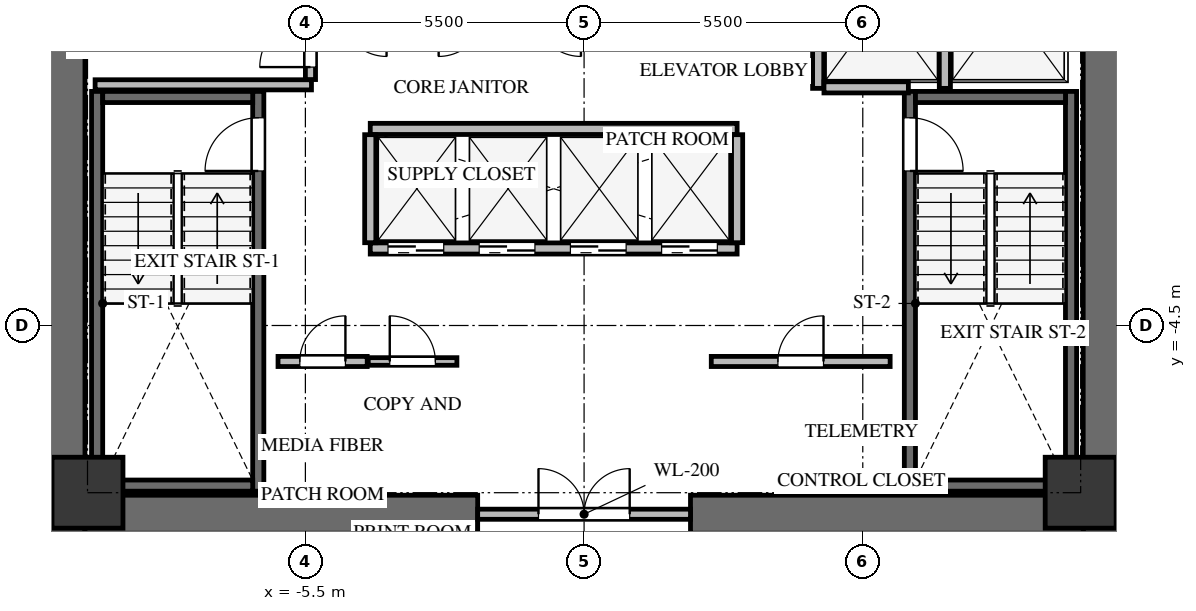
"""IFC4 building model, lengths in metres.
Left out: names, types, materials, properties, quantities, classifications, styles, units other than length and angle.
Written with IfcOpenShell. Run it as: python <this file> out.ifc"""

import sys

from ifc_helpers import new_model, si_unit, direction, frame, frame_2d, origin, origin_2d, place, context, subcontext, project, spatial, rectangle, extrude, source, transform, mapped, element, fill, save


model = new_model("IFC4")
c1 = context("Model", 3, precision=1e-05, world=origin(), true_north=direction((0.0, 1.0)))
c2 = subcontext(c1, "Body", "Model", "MODEL_VIEW")
j1 = project(units=[si_unit("LENGTHUNIT", "METRE"), si_unit("PLANEANGLEUNIT", "RADIAN")], contexts=[c1])
p1 = place(None, origin())
s1 = spatial("IfcSite", under=j1, at=p1, CompositionType="ELEMENT")
p2 = place(p1, origin())
s2 = spatial("IfcBuilding", under=s1, at=p2, CompositionType="ELEMENT")
p3 = place(p2, frame((0.0, 0.0, 120.6)))
s3 = spatial("IfcBuildingStorey", under=s2, at=p3, CompositionType="ELEMENT", Elevation=120.6)
for number, where, z_axis, x_axis in (
    (1, (-10.225, -8.6, 0.0), (0.0, 0.0, 1.0), (0.0, 1.0, 0.0)),
    (2, (10.225, -8.6, 0.0), (0.0, 0.0, 1.0), (0.0, 1.0, 0.0)),
):
    element("IfcWall", number, at=place(p3, frame(where, z_axis=z_axis, x_axis=x_axis)), inside=s3, PredefinedType="SHEAR", context=c2, shape_type="SweptSolid", body=[
        extrude(rectangle(XDim=17.2, YDim=0.75, at=frame_2d((8.6, 0.0))), origin(), (0.0, 0.0, 1.0), 3.3),
    ])
for number, where, z_axis, x_axis in (
    (3, (-9.85, -8.225, 0.0), (0.0, 0.0, 1.0), (1.0, 0.0, 0.0)),
    (4, (2.1, -8.225, 0.0), (0.0, 0.0, 1.0), (1.0, 0.0, 0.0)),
):
    element("IfcWall", number, at=place(p3, frame(where, z_axis=z_axis, x_axis=x_axis)), inside=s3, PredefinedType="SHEAR", context=c2, shape_type="SweptSolid", body=[
        extrude(rectangle(XDim=7.75, YDim=0.75, at=frame_2d((3.875, 0.0))), origin(), (0.0, 0.0, 1.0), 3.3),
    ])
p4 = place(p3, frame((-6.43, -7.77, -0.24), z_axis=(0.0, 0.0, 1.0), x_axis=(0.0, 1.0, 0.0)))
e5 = element("IfcWall", 5, at=p4, inside=s3, PredefinedType="SHEAR", context=c2, shape_type="SweptSolid", body=[
    extrude(rectangle(XDim=7.89, YDim=0.22, at=frame_2d((3.945, 0.0))), origin(), (0.0, 0.0, 1.0), 3.3),
])
p5 = place(p4, frame((6.32, 0.0, 0.0)))
e6 = element("IfcOpeningElement", 6, at=p5, cuts=e5, PredefinedType="OPENING", context=c2, shape_type="SweptSolid", body=[
    extrude(rectangle(XDim=1.05, YDim=2.15, at=frame_2d((0.525, 1.075))), frame((0.0, 0.12, 0.0), z_axis=(0.0, -1.0, 0.0), x_axis=(1.0, 0.0, 0.0)), (0.0, 0.0, 1.0), 0.24),
])
p6 = place(p3, frame((-9.61, 0.12, -0.24), z_axis=(0.0, 0.0, 1.0), x_axis=(0.0, -1.0, 0.0)))
e7 = element("IfcWall", 7, at=p6, inside=s3, PredefinedType="SHEAR", context=c2, shape_type="SweptSolid", body=[
    extrude(rectangle(XDim=7.89, YDim=0.22, at=frame_2d((3.945, 0.0))), origin(), (0.0, 0.0, 1.0), 3.3),
])
for number, where, z_axis, x_axis in (
    (8, (-9.5, -7.66, -0.24), (0.0, 0.0, 1.0), (1.0, 0.0, 0.0)),
    (9, (-6.54, 0.01, -0.24), (0.0, 0.0, 1.0), (-1.0, 0.0, 0.0)),
):
    element("IfcWall", number, at=place(p3, frame(where, z_axis=z_axis, x_axis=x_axis)), inside=s3, PredefinedType="SHEAR", context=c2, shape_type="SweptSolid", body=[
        extrude(rectangle(XDim=2.96, YDim=0.22, at=frame_2d((1.48, 0.0))), origin(), (0.0, 0.0, 1.0), 3.3),
    ])
p7 = place(p3, frame((9.61, -7.77, -0.24), z_axis=(0.0, 0.0, 1.0), x_axis=(0.0, 1.0, 0.0)))
e10 = element("IfcWall", 10, at=p7, inside=s3, PredefinedType="SHEAR", context=c2, shape_type="SweptSolid", body=[
    extrude(rectangle(XDim=7.89, YDim=0.22, at=frame_2d((3.945, 0.0))), origin(), (0.0, 0.0, 1.0), 3.3),
])
p8 = place(p3, frame((6.43, 0.12, -0.24), z_axis=(0.0, 0.0, 1.0), x_axis=(0.0, -1.0, 0.0)))
e11 = element("IfcWall", 11, at=p8, inside=s3, PredefinedType="SHEAR", context=c2, shape_type="SweptSolid", body=[
    extrude(rectangle(XDim=7.89, YDim=0.22, at=frame_2d((3.945, 0.0))), origin(), (0.0, 0.0, 1.0), 3.3),
])
p9 = place(p8, frame((0.52, 0.0, 0.0)))
e12 = element("IfcOpeningElement", 12, at=p9, cuts=e11, PredefinedType="OPENING", context=c2, shape_type="SweptSolid", body=[
    extrude(rectangle(XDim=1.05, YDim=2.15, at=frame_2d((0.525, 1.075))), frame((0.0, 0.12, 0.0), z_axis=(0.0, -1.0, 0.0), x_axis=(1.0, 0.0, 0.0)), (0.0, 0.0, 1.0), 0.24),
])
for number, where, z_axis, x_axis in (
    (13, (6.54, -7.66, -0.24), (0.0, 0.0, 1.0), (1.0, 0.0, 0.0)),
    (14, (9.5, 0.01, -0.24), (0.0, 0.0, 1.0), (-1.0, 0.0, 0.0)),
):
    element("IfcWall", number, at=place(p3, frame(where, z_axis=z_axis, x_axis=x_axis)), inside=s3, PredefinedType="SHEAR", context=c2, shape_type="SweptSolid", body=[
        extrude(rectangle(XDim=2.96, YDim=0.22, at=frame_2d((1.48, 0.0))), origin(), (0.0, 0.0, 1.0), 3.3),
    ])
m1 = source(origin(), c2, "Body", "SweptSolid", [
    extrude(rectangle(XDim=1.4, YDim=1.4, at=origin_2d()), origin(), (0.0, 0.0, 1.0), 3.3),
])
for number, where, z_axis, x_axis in (
    (15, (-9.8, -7.8, -0.24), (0.0, 0.0, 1.0), (1.0, 0.0, 0.0)),
    (16, (9.8, -7.8, -0.24), (0.0, 0.0, 1.0), (1.0, 0.0, 0.0)),
):
    element("IfcColumn", number, at=place(p3, frame(where, z_axis=z_axis, x_axis=x_axis)), inside=s3, PredefinedType="COLUMN", context=c2, shape_type="MappedRepresentation", body=[
        mapped(m1, transform((0.0, 0.0, 0.0), x_axis=(1.0, 0.0, 0.0), y_axis=(0.0, 1.0, 0.0), z_axis=(0.0, 0.0, 1.0), scale=1.0)),
    ])
p10 = place(p3, frame((-2.1, -8.225, 0.0), z_axis=(0.0, 0.0, 1.0), x_axis=(1.0, 0.0, 0.0)))
e17 = element("IfcWall", 17, at=p10, inside=s3, PredefinedType="SOLIDWALL", context=c2, shape_type="SweptSolid", body=[
    extrude(rectangle(XDim=4.2, YDim=0.2, at=frame_2d((2.1, 0.0))), origin(), (0.0, 0.0, 1.0), 3.045),
])
p11 = place(p10, frame((1.2, 0.0, 0.0)))
e18 = element("IfcOpeningElement", 18, at=p11, cuts=e17, PredefinedType="OPENING", context=c2, shape_type="SweptSolid", body=[
    extrude(rectangle(XDim=1.8, YDim=2.15, at=frame_2d((0.9, 1.075))), frame((0.0, 0.11, 0.0), z_axis=(0.0, -1.0, 0.0), x_axis=(1.0, 0.0, 0.0)), (0.0, 0.0, 1.0), 0.22),
])
p12 = place(p3, frame((-9.65, 0.25, 0.0), z_axis=(0.0, 0.0, 1.0), x_axis=(1.0, 0.0, 0.0)))
e19 = element("IfcWall", 19, at=p12, inside=s3, PredefinedType="SOLIDWALL", context=c2, shape_type="SweptSolid", body=[
    extrude(rectangle(XDim=4.27, YDim=0.2, at=frame_2d((2.135, 0.0))), origin(), (0.0, 0.0, 1.0), 3.045),
])
p13 = place(p3, frame((-5.4, 0.354, 0.0), z_axis=(0.0, 0.0, 1.0), x_axis=(0.0, 1.0, 0.0)))
e20 = element("IfcWall", 20, at=p13, inside=s3, PredefinedType="SOLIDWALL", context=c2, shape_type="SweptSolid", body=[
    extrude(rectangle(XDim=4.026, YDim=0.2, at=frame_2d((2.013, 0.0))), origin(), (0.0, 0.0, 1.0), 3.045),
])
p14 = place(p13, frame((0.246, 0.0, 0.0)))
e21 = element("IfcOpeningElement", 21, at=p14, cuts=e20, PredefinedType="OPENING", context=c2, shape_type="SweptSolid", body=[
    extrude(rectangle(XDim=1.0, YDim=2.15, at=frame_2d((0.5, 1.075))), frame((0.0, 0.11, 0.0), z_axis=(0.0, -1.0, 0.0), x_axis=(1.0, 0.0, 0.0)), (0.0, 0.0, 1.0), 0.22),
])
for number, where, z_axis, x_axis in (
    (22, (4.62, 0.18, 0.0), (0.0, 0.0, 1.0), (0.0, 1.0, 0.0)),
    (23, (7.12, 0.18, 0.0), (0.0, 0.0, 1.0), (0.0, 1.0, 0.0)),
):
    element("IfcWall", number, at=place(p3, frame(where, z_axis=z_axis, x_axis=x_axis)), inside=s3, PredefinedType="SOLIDWALL", context=c2, shape_type="SweptSolid", body=[
        extrude(rectangle(XDim=3.186, YDim=0.22, at=frame_2d((1.593, 0.0))), origin(), (0.0, 0.0, 1.0), 3.045),
    ])
p15 = place(p3, frame((4.734, 0.2, 0.0), z_axis=(0.0, 0.0, 1.0), x_axis=(1.0, 0.0, 0.0)))
e24 = element("IfcWall", 24, at=p15, inside=s3, PredefinedType="SOLIDWALL", context=c2, shape_type="SweptSolid", body=[
    extrude(rectangle(XDim=1.666, YDim=0.22, at=frame_2d((0.833, 0.0))), origin(), (0.0, 0.0, 1.0), 3.045),
])
p16 = place(p3, frame((-4.22, -2.98, 0.0), z_axis=(0.0, 0.0, 1.0), x_axis=(1.0, 0.0, 0.0)))
e25 = element("IfcWall", 25, at=p16, inside=s3, PredefinedType="SOLIDWALL", context=c2, shape_type="SweptSolid", body=[
    extrude(rectangle(XDim=7.24, YDim=0.22, at=frame_2d((3.62, 0.0))), origin(), (0.0, 0.0, 1.0), 3.045),
])
p17 = place(p16, frame((0.35, 0.0, 0.0)))
e26 = element("IfcOpeningElement", 26, at=p17, cuts=e25, PredefinedType="OPENING", context=c2, shape_type="SweptSolid", body=[
    extrude(rectangle(XDim=1.1, YDim=2.15, at=frame_2d((0.55, 1.075))), frame((0.0, 0.12, 0.0), z_axis=(0.0, -1.0, 0.0), x_axis=(1.0, 0.0, 0.0)), (0.0, 0.0, 1.0), 0.24),
])
p18 = place(p16, frame((2.15, 0.0, 0.0)))
e27 = element("IfcOpeningElement", 27, at=p18, cuts=e25, PredefinedType="OPENING", context=c2, shape_type="SweptSolid", body=[
    extrude(rectangle(XDim=1.1, YDim=2.15, at=frame_2d((0.55, 1.075))), frame((0.0, 0.12, 0.0), z_axis=(0.0, -1.0, 0.0), x_axis=(1.0, 0.0, 0.0)), (0.0, 0.0, 1.0), 0.24),
])
p19 = place(p16, frame((3.95, 0.0, 0.0)))
e28 = element("IfcOpeningElement", 28, at=p19, cuts=e25, PredefinedType="OPENING", context=c2, shape_type="SweptSolid", body=[
    extrude(rectangle(XDim=1.1, YDim=2.15, at=frame_2d((0.55, 1.075))), frame((0.0, 0.12, 0.0), z_axis=(0.0, -1.0, 0.0), x_axis=(1.0, 0.0, 0.0)), (0.0, 0.0, 1.0), 0.24),
])
p20 = place(p16, frame((5.75, 0.0, 0.0)))
e29 = element("IfcOpeningElement", 29, at=p20, cuts=e25, PredefinedType="OPENING", context=c2, shape_type="SweptSolid", body=[
    extrude(rectangle(XDim=1.1, YDim=2.15, at=frame_2d((0.55, 1.075))), frame((0.0, 0.12, 0.0), z_axis=(0.0, -1.0, 0.0), x_axis=(1.0, 0.0, 0.0)), (0.0, 0.0, 1.0), 0.24),
])
p21 = place(p3, frame((-4.22, -0.62, 0.0), z_axis=(0.0, 0.0, 1.0), x_axis=(1.0, 0.0, 0.0)))
e30 = element("IfcWall", 30, at=p21, inside=s3, PredefinedType="SOLIDWALL", context=c2, shape_type="SweptSolid", body=[
    extrude(rectangle(XDim=7.24, YDim=0.22, at=frame_2d((3.62, 0.0))), origin(), (0.0, 0.0, 1.0), 3.045),
])
for number, where, z_axis, x_axis in (
    (31, (-4.22, -2.866, 0.0), (0.0, 0.0, 1.0), (0.0, 1.0, 0.0)),
    (32, (3.02, -2.866, 0.0), (0.0, 0.0, 1.0), (0.0, 1.0, 0.0)),
):
    element("IfcWall", number, at=place(p3, frame(where, z_axis=z_axis, x_axis=x_axis)), inside=s3, PredefinedType="SOLIDWALL", context=c2, shape_type="SweptSolid", body=[
        extrude(rectangle(XDim=2.132, YDim=0.22, at=frame_2d((1.066, 0.0))), origin(), (0.0, 0.0, 1.0), 3.045),
    ])
p22 = place(p3, frame((-6.04, -5.21, 0.0), z_axis=(0.0, 0.0, 1.0), x_axis=(1.0, 0.0, 0.0)))
e33 = element("IfcWall", 33, at=p22, inside=s3, PredefinedType="SOLIDWALL", context=c2, shape_type="SweptSolid", body=[
    extrude(rectangle(XDim=1.76, YDim=0.2, at=frame_2d((0.88, 0.0))), origin(), (0.0, 0.0, 1.0), 3.045),
])
p23 = place(p22, frame((0.43, 0.0, 0.0)))
e34 = element("IfcOpeningElement", 34, at=p23, cuts=e33, PredefinedType="OPENING", context=c2, shape_type="SweptSolid", body=[
    extrude(rectangle(XDim=0.9, YDim=2.05, at=frame_2d((0.45, 1.025))), frame((0.0, 0.11, 0.0), z_axis=(0.0, -1.0, 0.0), x_axis=(1.0, 0.0, 0.0)), (0.0, 0.0, 1.0), 0.22),
])
p24 = place(p3, frame((-4.26, -5.21, 0.0), z_axis=(0.0, 0.0, 1.0), x_axis=(1.0, 0.0, 0.0)))
e35 = element("IfcWall", 35, at=p24, inside=s3, PredefinedType="PARTITIONING", context=c2, shape_type="SweptSolid", body=[
    extrude(rectangle(XDim=1.75, YDim=0.15, at=frame_2d((0.875, 0.0))), origin(), (0.0, 0.0, 1.0), 3.045),
])
p25 = place(p24, frame((0.425, 0.0, 0.0)))
e36 = element("IfcOpeningElement", 36, at=p25, cuts=e35, PredefinedType="OPENING", context=c2, shape_type="SweptSolid", body=[
    extrude(rectangle(XDim=0.9, YDim=2.05, at=frame_2d((0.45, 1.025))), frame((0.0, 0.085, 0.0), z_axis=(0.0, -1.0, 0.0), x_axis=(1.0, 0.0, 0.0)), (0.0, 0.0, 1.0), 0.17),
])
p26 = place(p3, frame((2.51, -5.21, 0.0), z_axis=(0.0, 0.0, 1.0), x_axis=(1.0, 0.0, 0.0)))
e37 = element("IfcWall", 37, at=p26, inside=s3, PredefinedType="SOLIDWALL", context=c2, shape_type="SweptSolid", body=[
    extrude(rectangle(XDim=3.53, YDim=0.2, at=frame_2d((1.765, 0.0))), origin(), (0.0, 0.0, 1.0), 3.045),
])
p27 = place(p26, frame((1.315, 0.0, 0.0)))
e38 = element("IfcOpeningElement", 38, at=p27, cuts=e37, PredefinedType="OPENING", context=c2, shape_type="SweptSolid", body=[
    extrude(rectangle(XDim=0.9, YDim=2.05, at=frame_2d((0.45, 1.025))), frame((0.0, 0.11, 0.0), z_axis=(0.0, -1.0, 0.0), x_axis=(1.0, 0.0, 0.0)), (0.0, 0.0, 1.0), 0.22),
])
m2 = source(origin(), c2, "Body", "SweptSolid", [
    extrude(rectangle(XDim=1.05, YDim=2.15, at=frame_2d((0.525, 1.075))), frame((0.0, 0.025, 0.0), z_axis=(0.0, -1.0, 0.0), x_axis=(1.0, 0.0, 0.0)), (0.0, 0.0, 1.0), 0.05),
])
p28 = place(p5, origin())
e39 = element("IfcDoor", 39, at=p28, inside=s3, OperationType="SINGLE_SWING_LEFT", PredefinedType="DOOR", context=c2, shape_type="MappedRepresentation", body=[
    mapped(m2, transform((0.0, 0.0, 0.0), x_axis=(1.0, 0.0, 0.0), y_axis=(0.0, 1.0, 0.0), z_axis=(0.0, 0.0, 1.0), scale=1.0)),
])
fill(e6, e39)
m3 = source(origin(), c2, "Body", "SweptSolid", [
    extrude(rectangle(XDim=1.05, YDim=2.15, at=frame_2d((0.525, 1.075))), frame((0.0, 0.025, 0.0), z_axis=(0.0, -1.0, 0.0), x_axis=(1.0, 0.0, 0.0)), (0.0, 0.0, 1.0), 0.05),
])
p29 = place(p9, origin())
e40 = element("IfcDoor", 40, at=p29, inside=s3, OperationType="SINGLE_SWING_RIGHT", PredefinedType="DOOR", context=c2, shape_type="MappedRepresentation", body=[
    mapped(m3, transform((0.0, 0.0, 0.0), x_axis=(1.0, 0.0, 0.0), y_axis=(0.0, 1.0, 0.0), z_axis=(0.0, 0.0, 1.0), scale=1.0)),
])
fill(e12, e40)
m4 = source(origin(), c2, "Body", "SweptSolid", [
    extrude(rectangle(XDim=1.8, YDim=2.15, at=frame_2d((0.9, 1.075))), frame((0.0, 0.025, 0.0), z_axis=(0.0, -1.0, 0.0), x_axis=(1.0, 0.0, 0.0)), (0.0, 0.0, 1.0), 0.05),
])
p30 = place(p11, origin())
e41 = element("IfcDoor", 41, at=p30, inside=s3, OperationType="DOUBLE_DOOR_SINGLE_SWING", PredefinedType="DOOR", context=c2, shape_type="MappedRepresentation", body=[
    mapped(m4, transform((0.0, 0.0, 0.0), x_axis=(1.0, 0.0, 0.0), y_axis=(0.0, 1.0, 0.0), z_axis=(0.0, 0.0, 1.0), scale=1.0)),
])
fill(e18, e41)
m5 = source(origin(), c2, "Body", "SweptSolid", [
    extrude(rectangle(XDim=1.0, YDim=2.15, at=frame_2d((0.5, 1.075))), frame((0.0, 0.025, 0.0), z_axis=(0.0, -1.0, 0.0), x_axis=(1.0, 0.0, 0.0)), (0.0, 0.0, 1.0), 0.05),
])
p31 = place(p14, origin())
e42 = element("IfcDoor", 42, at=p31, inside=s3, OperationType="SINGLE_SWING_LEFT", PredefinedType="DOOR", context=c2, shape_type="MappedRepresentation", body=[
    mapped(m5, transform((0.0, 0.0, 0.0), x_axis=(1.0, 0.0, 0.0), y_axis=(0.0, 1.0, 0.0), z_axis=(0.0, 0.0, 1.0), scale=1.0)),
])
fill(e21, e42)
m6 = source(origin(), c2, "Body", "SweptSolid", [
    extrude(rectangle(XDim=1.1, YDim=2.15, at=frame_2d((0.55, 1.075))), frame((0.0, 0.025, 0.0), z_axis=(0.0, -1.0, 0.0), x_axis=(1.0, 0.0, 0.0)), (0.0, 0.0, 1.0), 0.05),
])
p32 = place(p17, origin())
e43 = element("IfcDoor", 43, at=p32, inside=s3, OperationType="DOUBLE_DOOR_SLIDING", PredefinedType="DOOR", context=c2, shape_type="MappedRepresentation", body=[
    mapped(m6, transform((0.0, 0.0, 0.0), x_axis=(1.0, 0.0, 0.0), y_axis=(0.0, 1.0, 0.0), z_axis=(0.0, 0.0, 1.0), scale=1.0)),
])
fill(e26, e43)
p33 = place(p18, origin())
e44 = element("IfcDoor", 44, at=p33, inside=s3, OperationType="DOUBLE_DOOR_SLIDING", PredefinedType="DOOR", context=c2, shape_type="MappedRepresentation", body=[
    mapped(m6, transform((0.0, 0.0, 0.0), x_axis=(1.0, 0.0, 0.0), y_axis=(0.0, 1.0, 0.0), z_axis=(0.0, 0.0, 1.0), scale=1.0)),
])
fill(e27, e44)
p34 = place(p19, origin())
e45 = element("IfcDoor", 45, at=p34, inside=s3, OperationType="DOUBLE_DOOR_SLIDING", PredefinedType="DOOR", context=c2, shape_type="MappedRepresentation", body=[
    mapped(m6, transform((0.0, 0.0, 0.0), x_axis=(1.0, 0.0, 0.0), y_axis=(0.0, 1.0, 0.0), z_axis=(0.0, 0.0, 1.0), scale=1.0)),
])
fill(e28, e45)
p35 = place(p20, origin())
e46 = element("IfcDoor", 46, at=p35, inside=s3, OperationType="DOUBLE_DOOR_SLIDING", PredefinedType="DOOR", context=c2, shape_type="MappedRepresentation", body=[
    mapped(m6, transform((0.0, 0.0, 0.0), x_axis=(1.0, 0.0, 0.0), y_axis=(0.0, 1.0, 0.0), z_axis=(0.0, 0.0, 1.0), scale=1.0)),
])
fill(e29, e46)
m7 = source(origin(), c2, "Body", "SweptSolid", [
    extrude(rectangle(XDim=0.9, YDim=2.05, at=frame_2d((0.45, 1.025))), frame((0.0, 0.025, 0.0), z_axis=(0.0, -1.0, 0.0), x_axis=(1.0, 0.0, 0.0)), (0.0, 0.0, 1.0), 0.05),
])
p36 = place(p23, origin())
e47 = element("IfcDoor", 47, at=p36, inside=s3, OperationType="SINGLE_SWING_RIGHT", PredefinedType="DOOR", context=c2, shape_type="MappedRepresentation", body=[
    mapped(m7, transform((0.0, 0.0, 0.0), x_axis=(1.0, 0.0, 0.0), y_axis=(0.0, 1.0, 0.0), z_axis=(0.0, 0.0, 1.0), scale=1.0)),
])
fill(e34, e47)
m8 = source(origin(), c2, "Body", "SweptSolid", [
    extrude(rectangle(XDim=0.9, YDim=2.05, at=frame_2d((0.45, 1.025))), frame((0.0, 0.025, 0.0), z_axis=(0.0, -1.0, 0.0), x_axis=(1.0, 0.0, 0.0)), (0.0, 0.0, 1.0), 0.05),
])
p37 = place(p25, origin())
e48 = element("IfcDoor", 48, at=p37, inside=s3, OperationType="SINGLE_SWING_LEFT", PredefinedType="DOOR", context=c2, shape_type="MappedRepresentation", body=[
    mapped(m8, transform((0.0, 0.0, 0.0), x_axis=(1.0, 0.0, 0.0), y_axis=(0.0, 1.0, 0.0), z_axis=(0.0, 0.0, 1.0), scale=1.0)),
])
fill(e36, e48)
p38 = place(p27, origin())
e49 = element("IfcDoor", 49, at=p38, inside=s3, OperationType="SINGLE_SWING_RIGHT", PredefinedType="DOOR", context=c2, shape_type="MappedRepresentation", body=[
    mapped(m7, transform((0.0, 0.0, 0.0), x_axis=(1.0, 0.0, 0.0), y_axis=(0.0, 1.0, 0.0), z_axis=(0.0, 0.0, 1.0), scale=1.0)),
])
fill(e38, e49)
save(model, sys.argv[1])
